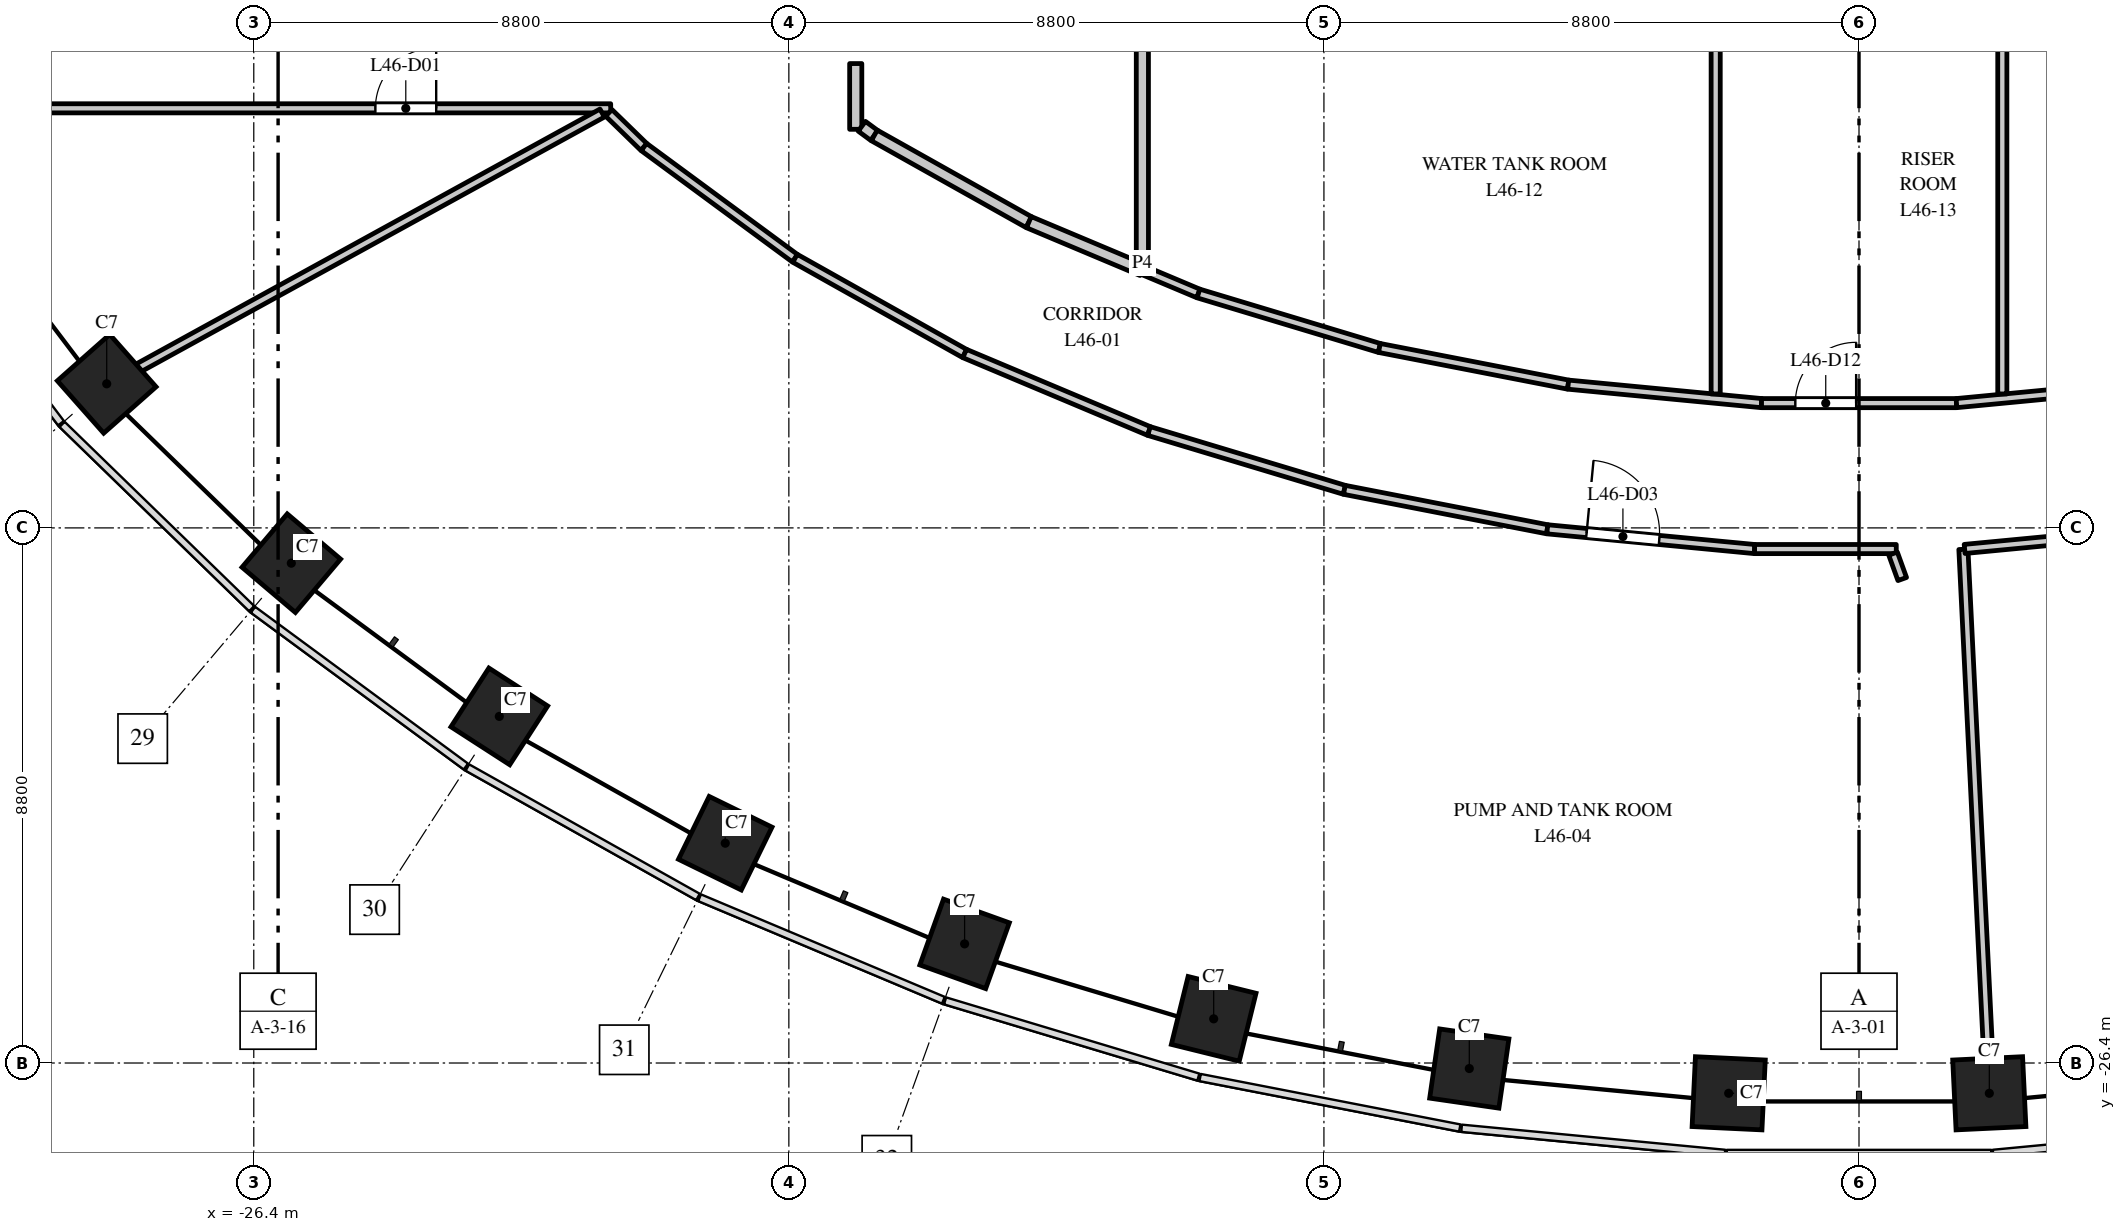
"""IFC4 building model, lengths in metres.
Left out: names, types, materials, properties, quantities, classifications, styles, units other than length and angle.
Written with IfcOpenShell. Run it as: python <this file> out.ifc"""

import sys

from ifc_helpers import new_model, si_unit, direction, frame, frame_2d, origin, origin_2d, place, context, subcontext, project, spatial, rectangle, extrude, element, fill, save


model = new_model("IFC4")
c1 = context("Model", 3, precision=1e-05, world=origin(), true_north=direction((0.0, 1.0)))
c2 = subcontext(c1, "Body", "Model", "MODEL_VIEW")
j1 = project(units=[si_unit("LENGTHUNIT", "METRE"), si_unit("PLANEANGLEUNIT", "RADIAN")], contexts=[c1])
p1 = place(None, origin())
s1 = spatial("IfcSite", under=j1, at=p1, CompositionType="ELEMENT")
p2 = place(p1, origin())
s2 = spatial("IfcBuilding", under=s1, at=p2, CompositionType="ELEMENT")
p3 = place(p2, frame((0.0, 0.0, 198.0)))
s3 = spatial("IfcBuildingStorey", under=s2, at=p3, CompositionType="ELEMENT", Elevation=198.0)
for number, where, z_axis, x_axis in (
    (1, (-28.819, -15.23, 0.0), (0.0, 0.0, 1.0), (0.663, -0.749, 0.0)),
    (2, (-25.783, -18.18, 0.0), (0.0, 0.0, 1.0), (0.763, -0.646, 0.0)),
    (3, (-22.362, -20.7, 0.0), (0.0, 0.0, 1.0), (0.84, -0.542, 0.0)),
    (4, (-18.646, -22.785, 0.0), (0.0, 0.0, 1.0), (0.898, -0.439, 0.0)),
    (5, (-14.709, -24.441, 0.0), (0.0, 0.0, 1.0), (0.941, -0.338, 0.0)),
    (6, (-10.613, -25.674, 0.0), (0.0, 0.0, 1.0), (0.971, -0.24, 0.0)),
    (7, (-6.409, -26.491, 0.0), (0.0, 0.0, 1.0), (0.99, -0.143, 0.0)),
    (8, (-2.143, -26.898, 0.0), (0.0, 0.0, 1.0), (0.999, -0.048, 0.0)),
    (9, (2.143, -26.898, 0.0), (0.0, 0.0, 1.0), (0.999, 0.048, 0.0)),
):
    element("IfcColumn", number, at=place(p3, frame(where, z_axis=z_axis, x_axis=x_axis)), inside=s3, PredefinedType="COLUMN", context=c2, shape_type="SweptSolid", body=[
        extrude(rectangle(XDim=1.15, YDim=1.15, at=origin_2d()), origin(), (0.0, 0.0, 1.0), 5.5),
    ])
p4 = place(p3, frame((-30.15, -10.7, 0.0), z_axis=(0.0, 0.0, 1.0), x_axis=(1.0, 0.0, 0.0)))
e10 = element("IfcWall", 10, at=p4, inside=s3, PredefinedType="PARTITIONING", context=c2, shape_type="SweptSolid", body=[
    extrude(rectangle(XDim=9.62, YDim=0.15, at=frame_2d((4.81, 0.0))), origin(), (0.0, 0.0, 1.0), 4.35),
])
p5 = place(p4, frame((5.75, 0.0, 0.0)))
e11 = element("IfcOpeningElement", 11, at=p5, cuts=e10, PredefinedType="OPENING", context=c2, shape_type="SweptSolid", body=[
    extrude(rectangle(XDim=1.0, YDim=2.1, at=frame_2d((0.5, 1.05))), frame((0.0, 0.085, 0.0), z_axis=(0.0, -1.0, 0.0), x_axis=(1.0, 0.0, 0.0)), (0.0, 0.0, 1.0), 0.17),
])
p6 = place(p3, frame((-28.893, -15.297, 0.0), z_axis=(0.0, 0.0, 1.0), x_axis=(0.876381760949, 0.481617077227, 0.0)))
e12 = element("IfcWall", 12, at=p6, inside=s3, PredefinedType="PARTITIONING", context=c2, shape_type="SweptSolid", body=[
    extrude(rectangle(XDim=9.383, YDim=0.15, at=frame_2d((4.691, 0.0))), origin(), (0.0, 0.0, 1.0), 5.15),
])
p7 = place(p3, frame((-20.561, -10.775, 0.0), z_axis=(0.0, 0.0, 1.0), x_axis=(0.717045449997, -0.697026414591, 0.0)))
e13 = element("IfcWall", 13, at=p7, inside=s3, PredefinedType="PARTITIONING", context=c2, shape_type="SweptSolid", body=[
    extrude(rectangle(XDim=0.805, YDim=0.15, at=frame_2d((0.402, 0.0))), origin(), (0.0, 0.0, 1.0), 5.15),
])
p8 = place(p3, frame((-19.984, -11.336, 0.0), z_axis=(0.0, 0.0, 1.0), x_axis=(0.805191029373, -0.593015519373, 0.0)))
e14 = element("IfcWall", 14, at=p8, inside=s3, PredefinedType="PARTITIONING", context=c2, shape_type="SweptSolid", body=[
    extrude(rectangle(XDim=3.086, YDim=0.15, at=frame_2d((1.543, 0.0))), origin(), (0.0, 0.0, 1.0), 4.2),
])
p9 = place(p3, frame((-17.499, -13.166, 0.0), z_axis=(0.0, 0.0, 1.0), x_axis=(0.872039782413, -0.489434998635, 0.0)))
e15 = element("IfcWall", 15, at=p9, inside=s3, PredefinedType="PARTITIONING", context=c2, shape_type="SweptSolid", body=[
    extrude(rectangle(XDim=3.199, YDim=0.15, at=frame_2d((1.6, 0.0))), origin(), (0.0, 0.0, 1.0), 5.15),
])
p10 = place(p3, frame((-16.5, -11.045, 0.0), z_axis=(0.0, 0.0, 1.0), x_axis=(0.0, 1.0, 0.0)))
e16 = element("IfcWall", 16, at=p10, inside=s3, PredefinedType="PARTITIONING", context=c2, shape_type="SweptSolid", body=[
    extrude(rectangle(XDim=1.081, YDim=0.2, at=frame_2d((0.541, 0.0))), origin(), (0.0, 0.0, 1.0), 5.15),
])
p11 = place(p3, frame((-16.4, -10.995, 0.0), z_axis=(0.0, 0.0, 1.0), x_axis=(0.805152309286, -0.593068089558, 0.0)))
e17 = element("IfcWall", 17, at=p11, inside=s3, PredefinedType="PARTITIONING", context=c2, shape_type="SweptSolid", body=[
    extrude(rectangle(XDim=0.254, YDim=0.2, at=frame_2d((0.127, 0.0))), origin(), (0.0, 0.0, 1.0), 5.15),
])
p12 = place(p3, frame((-16.195, -11.146, 0.0), z_axis=(0.0, 0.0, 1.0), x_axis=(0.872138682379, -0.48925874412, 0.0)))
e18 = element("IfcWall", 18, at=p12, inside=s3, PredefinedType="PARTITIONING", context=c2, shape_type="SweptSolid", body=[
    extrude(rectangle(XDim=2.915, YDim=0.2, at=frame_2d((1.457, 0.0))), origin(), (0.0, 0.0, 1.0), 4.2),
])
p13 = place(p3, frame((-14.709, -14.732, 0.0), z_axis=(0.0, 0.0, 1.0), x_axis=(0.921795970681, -0.387675364753, 0.0)))
e19 = element("IfcWall", 19, at=p13, inside=s3, PredefinedType="PARTITIONING", context=c2, shape_type="SweptSolid", body=[
    extrude(rectangle(XDim=3.289, YDim=0.15, at=frame_2d((1.645, 0.0))), origin(), (0.0, 0.0, 1.0), 4.3),
])
p14 = place(p3, frame((-13.653, -12.572, 0.0), z_axis=(0.0, 0.0, 1.0), x_axis=(0.921859843246, -0.387523456595, 0.0)))
e20 = element("IfcWall", 20, at=p14, inside=s3, PredefinedType="PARTITIONING", context=c2, shape_type="SweptSolid", body=[
    extrude(rectangle(XDim=2.025, YDim=0.2, at=frame_2d((1.013, 0.0))), origin(), (0.0, 0.0, 1.0), 5.15),
])
p15 = place(p3, frame((-11.786, -13.357, 0.0), z_axis=(0.0, 0.0, 1.0), x_axis=(0.921626186184, -0.388078823102, 0.0)))
e21 = element("IfcWall", 21, at=p15, inside=s3, PredefinedType="PARTITIONING", context=c2, shape_type="SweptSolid", body=[
    extrude(rectangle(XDim=1.0, YDim=0.15, at=frame_2d((0.5, 0.0))), origin(), (0.0, 0.0, 1.0), 4.3),
])
p16 = place(p3, frame((-11.786, -13.246, 0.0), z_axis=(0.0, 0.0, 1.0), x_axis=(0.0, 1.0, 0.0)))
e22 = element("IfcWall", 22, at=p16, inside=s3, PredefinedType="PARTITIONING", context=c2, shape_type="SweptSolid", body=[
    extrude(rectangle(XDim=26.492, YDim=0.2, at=frame_2d((13.246, 0.0))), origin(), (0.0, 0.0, 1.0), 4.2),
])
p17 = place(p3, frame((-11.677, -16.007, 0.0), z_axis=(0.0, 0.0, 1.0), x_axis=(0.957565546192, -0.28821558727, 0.0)))
e23 = element("IfcWall", 23, at=p17, inside=s3, PredefinedType="PARTITIONING", context=c2, shape_type="SweptSolid", body=[
    extrude(rectangle(XDim=3.355, YDim=0.15, at=frame_2d((1.678, 0.0))), origin(), (0.0, 0.0, 1.0), 5.15),
])
p18 = place(p3, frame((-10.864, -13.745, 0.0), z_axis=(0.0, 0.0, 1.0), x_axis=(0.957544770641, -0.28828460281, 0.0)))
e24 = element("IfcWall", 24, at=p18, inside=s3, PredefinedType="PARTITIONING", context=c2, shape_type="SweptSolid", body=[
    extrude(rectangle(XDim=3.108, YDim=0.15, at=frame_2d((1.554, 0.0))), origin(), (0.0, 0.0, 1.0), 5.15),
])
p19 = place(p3, frame((-8.464, -16.974, 0.0), z_axis=(0.0, 0.0, 1.0), x_axis=(0.981613520879, -0.190879269771, 0.0)))
e25 = element("IfcWall", 25, at=p19, inside=s3, PredefinedType="PARTITIONING", context=c2, shape_type="SweptSolid", body=[
    extrude(rectangle(XDim=3.4, YDim=0.15, at=frame_2d((1.7, 0.0))), origin(), (0.0, 0.0, 1.0), 4.3),
])
p20 = place(p3, frame((-7.888, -14.641, 0.0), z_axis=(0.0, 0.0, 1.0), x_axis=(0.981672390077, -0.190576280162, 0.0)))
e26 = element("IfcWall", 26, at=p20, inside=s3, PredefinedType="PARTITIONING", context=c2, shape_type="SweptSolid", body=[
    extrude(rectangle(XDim=3.163, YDim=0.15, at=frame_2d((1.582, 0.0))), origin(), (0.0, 0.0, 1.0), 4.3),
])
p21 = place(p3, frame((-5.127, -17.623, 0.0), z_axis=(0.0, 0.0, 1.0), x_axis=(0.995490025265, -0.094866272186, 0.0)))
e27 = element("IfcWall", 27, at=p21, inside=s3, PredefinedType="PARTITIONING", context=c2, shape_type="SweptSolid", body=[
    extrude(rectangle(XDim=3.425, YDim=0.15, at=frame_2d((1.713, 0.0))), origin(), (0.0, 0.0, 1.0), 5.15),
])
p22 = place(p21, frame((0.65, 0.0, 0.0)))
e28 = element("IfcOpeningElement", 28, at=p22, cuts=e27, PredefinedType="OPENING", context=c2, shape_type="SweptSolid", body=[
    extrude(rectangle(XDim=1.2, YDim=2.1, at=frame_2d((0.6, 1.05))), frame((0.0, 0.085, 0.0), z_axis=(0.0, -1.0, 0.0), x_axis=(1.0, 0.0, 0.0)), (0.0, 0.0, 1.0), 0.17),
])
p23 = place(p3, frame((-4.783, -15.244, 0.0), z_axis=(0.0, 0.0, 1.0), x_axis=(0.995455539839, -0.095227455097, 0.0)))
e29 = element("IfcWall", 29, at=p23, inside=s3, PredefinedType="PARTITIONING", context=c2, shape_type="SweptSolid", body=[
    extrude(rectangle(XDim=3.194, YDim=0.15, at=frame_2d((1.597, 0.0))), origin(), (0.0, 0.0, 1.0), 5.15),
])
p24 = place(p3, frame((-2.357, -15.397, 0.0), z_axis=(0.0, 0.0, 1.0), x_axis=(0.0, 1.0, 0.0)))
e30 = element("IfcWall", 30, at=p24, inside=s3, PredefinedType="PARTITIONING", context=c2, shape_type="SweptSolid", body=[
    extrude(rectangle(XDim=8.187, YDim=0.15, at=frame_2d((4.094, 0.0))), origin(), (0.0, 0.0, 1.0), 4.35),
])
p25 = place(p3, frame((-1.717, -17.948, 0.0), z_axis=(0.0, 0.0, 1.0), x_axis=(1.0, 0.0, 0.0)))
e31 = element("IfcWall", 31, at=p25, inside=s3, PredefinedType="PARTITIONING", context=c2, shape_type="SweptSolid", body=[
    extrude(rectangle(XDim=2.33, YDim=0.15, at=frame_2d((1.165, 0.0))), origin(), (0.0, 0.0, 1.0), 4.3),
])
p26 = place(p3, frame((-1.603, -15.548, 0.0), z_axis=(0.0, 0.0, 1.0), x_axis=(1.0, 0.0, 0.0)))
e32 = element("IfcWall", 32, at=p26, inside=s3, PredefinedType="PARTITIONING", context=c2, shape_type="SweptSolid", body=[
    extrude(rectangle(XDim=3.206, YDim=0.15, at=frame_2d((1.603, 0.0))), origin(), (0.0, 0.0, 1.0), 4.3),
])
p27 = place(p26, frame((0.556, 0.0, 0.0)))
e33 = element("IfcOpeningElement", 33, at=p27, cuts=e32, PredefinedType="OPENING", context=c2, shape_type="SweptSolid", body=[
    extrude(rectangle(XDim=1.0, YDim=2.1, at=frame_2d((0.5, 1.05))), frame((0.0, 0.085, 0.0), z_axis=(0.0, -1.0, 0.0), x_axis=(1.0, 0.0, 0.0)), (0.0, 0.0, 1.0), 0.17),
])
p28 = place(p3, frame((0.56, -18.023, 0.0), z_axis=(0.0, 0.0, 1.0), x_axis=(0.339536454316, -0.940592896098, 0.0)))
e34 = element("IfcWall", 34, at=p28, inside=s3, PredefinedType="PARTITIONING", context=c2, shape_type="SweptSolid", body=[
    extrude(rectangle(XDim=0.444, YDim=0.15, at=frame_2d((0.222, 0.0))), origin(), (0.0, 0.0, 1.0), 5.15),
])
p29 = place(p3, frame((1.603, -15.548, 0.0), z_axis=(0.0, 0.0, 1.0), x_axis=(0.995455539839, 0.095227455097, 0.0)))
e35 = element("IfcWall", 35, at=p29, inside=s3, PredefinedType="PARTITIONING", context=c2, shape_type="SweptSolid", body=[
    extrude(rectangle(XDim=3.194, YDim=0.15, at=frame_2d((1.597, 0.0))), origin(), (0.0, 0.0, 1.0), 4.3),
])
p30 = place(p3, frame((1.717, -17.952, 0.0), z_axis=(0.0, 0.0, 1.0), x_axis=(0.049011179308, -0.998798230026, 0.0)))
e36 = element("IfcWall", 36, at=p30, inside=s3, PredefinedType="PARTITIONING", context=c2, shape_type="SweptSolid", body=[
    extrude(rectangle(XDim=9.056, YDim=0.15, at=frame_2d((4.528, 0.0))), origin(), (0.0, 0.0, 1.0), 5.15),
])
p31 = place(p3, frame((1.737, -17.946, 0.0), z_axis=(0.0, 0.0, 1.0), x_axis=(0.995491282675, 0.094853076484, 0.0)))
e37 = element("IfcWall", 37, at=p31, inside=s3, PredefinedType="PARTITIONING", context=c2, shape_type="SweptSolid", body=[
    extrude(rectangle(XDim=3.405, YDim=0.15, at=frame_2d((1.703, 0.0))), origin(), (0.0, 0.0, 1.0), 4.3),
])
p32 = place(p3, frame((2.357, -15.397, 0.0), z_axis=(0.0, 0.0, 1.0), x_axis=(0.0, 1.0, 0.0)))
e38 = element("IfcWall", 38, at=p32, inside=s3, PredefinedType="PARTITIONING", context=c2, shape_type="SweptSolid", body=[
    extrude(rectangle(XDim=8.187, YDim=0.15, at=frame_2d((4.094, 0.0))), origin(), (0.0, 0.0, 1.0), 4.3),
])
p33 = place(p5, origin())
e39 = element("IfcDoor", 39, at=p33, inside=s3, OperationType="SINGLE_SWING_RIGHT", PredefinedType="DOOR", context=c2, shape_type="SweptSolid", body=[
    extrude(rectangle(XDim=1.0, YDim=2.1, at=frame_2d((0.5, 1.05))), frame((0.0, 0.025, 0.0), z_axis=(0.0, -1.0, 0.0), x_axis=(1.0, 0.0, 0.0)), (0.0, 0.0, 1.0), 0.05),
])
fill(e11, e39)
p34 = place(p22, origin())
e40 = element("IfcDoor", 40, at=p34, inside=s3, OperationType="SINGLE_SWING_LEFT", PredefinedType="DOOR", context=c2, shape_type="SweptSolid", body=[
    extrude(rectangle(XDim=1.2, YDim=2.1, at=frame_2d((0.6, 1.05))), frame((0.0, 0.025, 0.0), z_axis=(0.0, -1.0, 0.0), x_axis=(1.0, 0.0, 0.0)), (0.0, 0.0, 1.0), 0.05),
])
fill(e28, e40)
p35 = place(p27, origin())
e41 = element("IfcDoor", 41, at=p35, inside=s3, OperationType="SINGLE_SWING_RIGHT", PredefinedType="DOOR", context=c2, shape_type="SweptSolid", body=[
    extrude(rectangle(XDim=1.0, YDim=2.1, at=frame_2d((0.5, 1.05))), frame((0.0, 0.025, 0.0), z_axis=(0.0, -1.0, 0.0), x_axis=(1.0, 0.0, 0.0)), (0.0, 0.0, 1.0), 0.05),
])
fill(e33, e41)
save(model, sys.argv[1])
